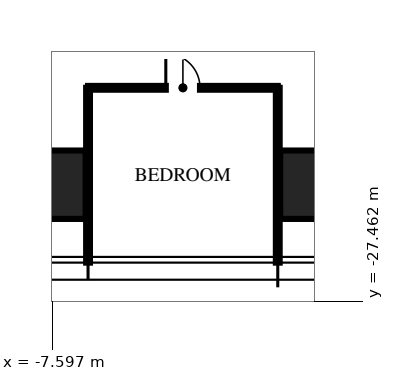
"""IFC4 building model, lengths in metres.
Left out: names, types, materials, properties, quantities, classifications, styles, units other than length and angle.
Written with IfcOpenShell. Run it as: python <this file> out.ifc"""

import sys

from ifc_helpers import new_model, si_unit, direction, frame, frame_2d, origin, origin_2d, place, context, subcontext, project, spatial, rectangle, hollow_rectangle, extrude, element, fill, save


model = new_model("IFC4")
c1 = context("Model", 3, precision=1e-05, world=origin(), true_north=direction((0.0, 1.0)))
c2 = subcontext(c1, "Body", "Model", "MODEL_VIEW")
j1 = project(units=[si_unit("LENGTHUNIT", "METRE"), si_unit("PLANEANGLEUNIT", "RADIAN")], contexts=[c1])
p1 = place(None, origin())
s1 = spatial("IfcSite", under=j1, at=p1, CompositionType="ELEMENT")
p2 = place(p1, origin())
s2 = spatial("IfcBuilding", under=s1, at=p2, CompositionType="ELEMENT")
p3 = place(p2, frame((0.0, 0.0, 210.75)))
s3 = spatial("IfcBuildingStorey", under=s2, at=p3, CompositionType="ELEMENT", Elevation=210.75)
for number, where, z_axis, x_axis in (
    (1, (0.0, -24.4, 0.0), (0.0, 0.0, 1.0), (1.0, 0.0, 0.0)),
    (2, (-8.32, -24.4, 0.0), (0.0, 0.0, 1.0), (1.0, 0.0, 0.0)),
):
    element("IfcColumn", number, at=place(p3, frame(where, z_axis=z_axis, x_axis=x_axis)), inside=s3, PredefinedType="COLUMN", context=c2, shape_type="SweptSolid", body=[
        extrude(hollow_rectangle(XDim=3.2, YDim=1.8, WallThickness=0.2, at=origin_2d()), origin(), (0.0, 0.0, 1.0), 3.75),
    ])
for number, where, z_axis, x_axis in (
    (3, (-6.656, -21.85, 0.0), (0.0, 0.0, 1.0), (0.0, -1.0, 0.0)),
    (4, (-1.664, -21.85, 0.0), (0.0, 0.0, 1.0), (0.0, -1.0, 0.0)),
):
    element("IfcWall", number, at=place(p3, frame(where, z_axis=z_axis, x_axis=x_axis)), inside=s3, PredefinedType="PARTITIONING", context=c2, shape_type="SweptSolid", body=[
        extrude(rectangle(XDim=4.6, YDim=0.1, at=frame_2d((2.3, 0.0))), origin(), (0.0, 0.0, 1.0), 2.91),
    ])
p4 = place(p3, frame((-6.656, -21.85, 0.0), z_axis=(0.0, 0.0, 1.0), x_axis=(1.0, 0.0, 0.0)))
e5 = element("IfcWall", 5, at=p4, inside=s3, PredefinedType="PARTITIONING", context=c2, shape_type="SweptSolid", body=[
    extrude(rectangle(XDim=4.992, YDim=0.1, at=frame_2d((2.496, 0.0))), origin(), (0.0, 0.0, 1.0), 2.81),
])
p5 = place(p4, frame((2.046, 0.0, 0.0)))
e6 = element("IfcOpeningElement", 6, at=p5, cuts=e5, PredefinedType="OPENING", context=c2, shape_type="SweptSolid", body=[
    extrude(rectangle(XDim=0.9, YDim=2.1, at=frame_2d((0.45, 1.05))), frame((0.0, 0.06, 0.0), z_axis=(0.0, -1.0, 0.0), x_axis=(1.0, 0.0, 0.0)), (0.0, 0.0, 1.0), 0.12),
])
p6 = place(p5, origin())
e7 = element("IfcDoor", 7, at=p6, inside=s3, OperationType="SINGLE_SWING_LEFT", PredefinedType="DOOR", context=c2, shape_type="SweptSolid", body=[
    extrude(rectangle(XDim=0.9, YDim=2.1, at=frame_2d((0.45, 1.05))), frame((0.0, 0.025, 0.0), z_axis=(0.0, -1.0, 0.0), x_axis=(1.0, 0.0, 0.0)), (0.0, 0.0, 1.0), 0.05),
])
fill(e6, e7)
save(model, sys.argv[1])
